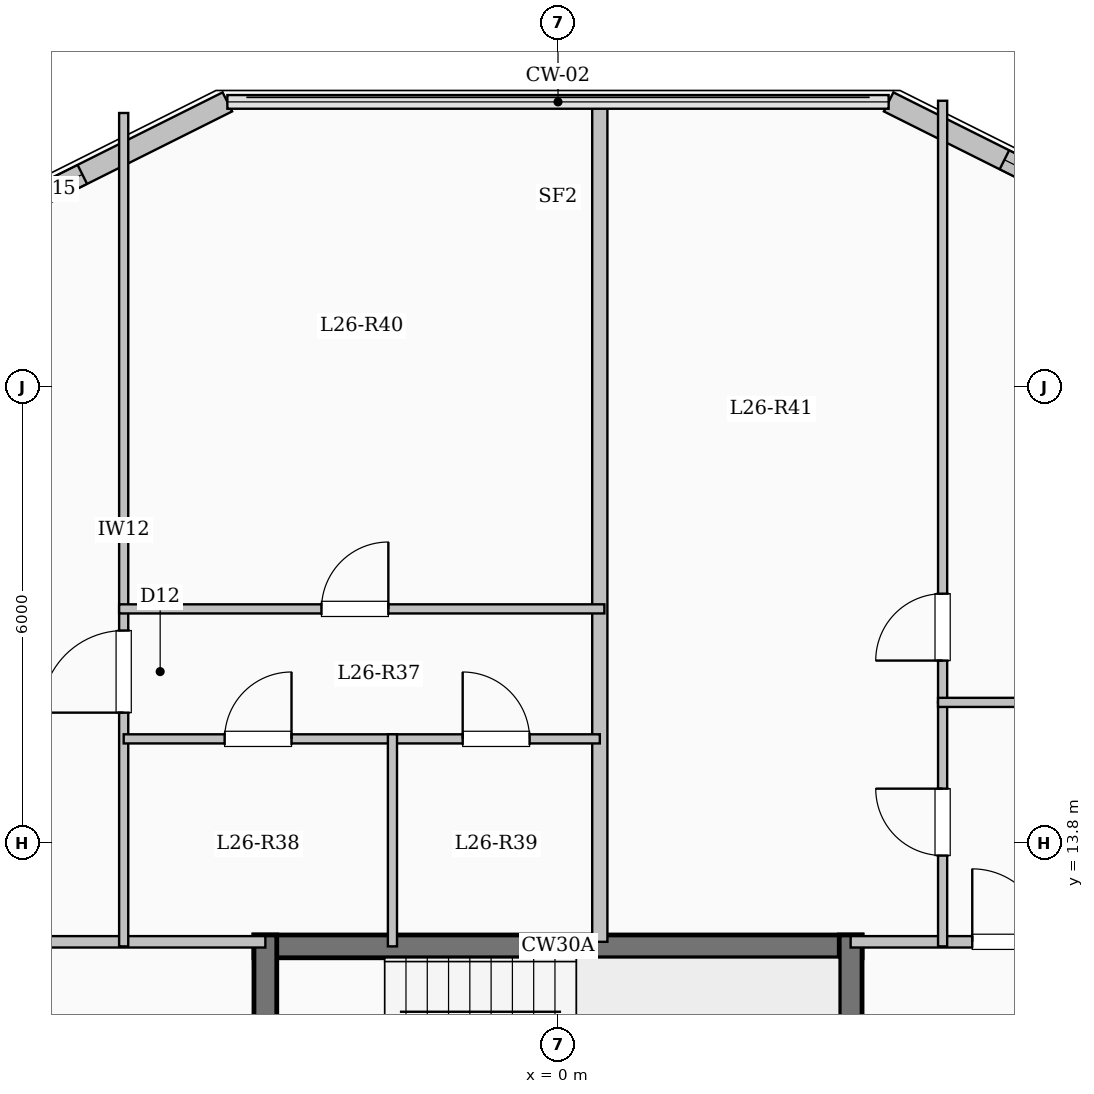
"""IFC4 building model, lengths in metres.
Left out: names, types, materials, properties, quantities, classifications, styles, units other than length and angle.
Written with IfcOpenShell. Run it as: python <this file> out.ifc"""

import sys

from ifc_helpers import new_model, si_unit, direction, frame, frame_2d, origin, place, context, subcontext, project, spatial, rectangle, extrude, element, fill, save


model = new_model("IFC4")
c1 = context("Model", 3, precision=1e-05, world=origin(), true_north=direction((0.0, 1.0)))
c2 = subcontext(c1, "Body", "Model", "MODEL_VIEW")
j1 = project(units=[si_unit("LENGTHUNIT", "METRE"), si_unit("PLANEANGLEUNIT", "RADIAN")], contexts=[c1])
p1 = place(None, origin())
s1 = spatial("IfcSite", under=j1, at=p1, CompositionType="ELEMENT")
p2 = place(p1, origin())
s2 = spatial("IfcBuilding", under=s1, at=p2, CompositionType="ELEMENT")
p3 = place(p2, frame((0.0, 0.0, 98.4)))
s3 = spatial("IfcBuildingStorey", under=s2, at=p3, CompositionType="ELEMENT", Elevation=98.4)
p4 = place(p3, frame((-7.35, 22.05, 0.0), z_axis=(0.0, 0.0, 1.0), x_axis=(0.894427191, 0.4472135955, 0.0)))
e1 = element("IfcWall", 1, at=p4, inside=s3, PredefinedType="SOLIDWALL", context=c2, shape_type="SweptSolid", body=[
    extrude(rectangle(XDim=3.354, YDim=0.28, at=frame_2d((1.677, 0.0))), origin(), (0.0, 0.0, 1.0), 3.1),
])
p5 = place(p4, frame((0.371, 0.0, 0.95)))
e2 = element("IfcOpeningElement", 2, at=p5, cuts=e1, PredefinedType="OPENING", context=c2, shape_type="SweptSolid", body=[
    extrude(rectangle(XDim=0.85, YDim=1.5, at=frame_2d((0.425, 0.75))), frame((0.0, 0.15, 0.0), z_axis=(0.0, -1.0, 0.0), x_axis=(1.0, 0.0, 0.0)), (0.0, 0.0, 1.0), 0.3),
])
p6 = place(p3, frame((4.35, 23.55, 0.0), z_axis=(0.0, 0.0, 1.0), x_axis=(0.894427191, -0.4472135955, 0.0)))
e3 = element("IfcWall", 3, at=p6, inside=s3, PredefinedType="SOLIDWALL", context=c2, shape_type="SweptSolid", body=[
    extrude(rectangle(XDim=3.354, YDim=0.28, at=frame_2d((1.677, 0.0))), origin(), (0.0, 0.0, 1.0), 3.1),
])
p7 = place(p6, frame((1.703, 0.0, 0.95)))
e4 = element("IfcOpeningElement", 4, at=p7, cuts=e3, PredefinedType="OPENING", context=c2, shape_type="SweptSolid", body=[
    extrude(rectangle(XDim=1.2, YDim=1.5, at=frame_2d((0.6, 0.75))), frame((0.0, 0.15, 0.0), z_axis=(0.0, -1.0, 0.0), x_axis=(1.0, 0.0, 0.0)), (0.0, 0.0, 1.0), 0.3),
])
p8 = place(p3, frame((-4.0, 12.44, 0.0), z_axis=(0.0, 0.0, 1.0), x_axis=(1.0, 0.0, 0.0)))
e5 = element("IfcWall", 5, at=p8, inside=s3, PredefinedType="SHEAR", context=c2, shape_type="SweptSolid", body=[
    extrude(rectangle(XDim=8.0, YDim=0.3, at=frame_2d((4.0, 0.0))), origin(), (0.0, 0.0, 1.0), 3.35),
])
for number, where, z_axis, x_axis in (
    (6, (-3.85, 9.0, 0.0), (0.0, 0.0, 1.0), (0.0, 1.0, 0.0)),
    (7, (3.85, 9.0, 0.0), (0.0, 0.0, 1.0), (0.0, 1.0, 0.0)),
):
    element("IfcWall", number, at=place(p3, frame(where, z_axis=z_axis, x_axis=x_axis)), inside=s3, PredefinedType="SHEAR", context=c2, shape_type="SweptSolid", body=[
        extrude(rectangle(XDim=3.59, YDim=0.3, at=frame_2d((1.795, 0.0))), origin(), (0.0, 0.0, 1.0), 3.35),
    ])
p9 = place(p3, frame((-21.05, 12.5, 0.0), z_axis=(0.0, 0.0, 1.0), x_axis=(1.0, 0.0, 0.0)))
e8 = element("IfcWall", 8, at=p9, inside=s3, PredefinedType="PARTITIONING", context=c2, shape_type="SweptSolid", body=[
    extrude(rectangle(XDim=17.2, YDim=0.15, at=frame_2d((8.6, 0.0))), origin(), (0.0, 0.0, 1.0), 3.1),
])
p10 = place(p9, frame((0.7, 0.0, 0.0)))
e9 = element("IfcOpeningElement", 9, at=p10, cuts=e8, PredefinedType="OPENING", context=c2, shape_type="SweptSolid", body=[
    extrude(rectangle(XDim=0.96, YDim=2.15, at=frame_2d((0.48, 1.075))), frame((0.0, 0.085, 0.0), z_axis=(0.0, -1.0, 0.0), x_axis=(1.0, 0.0, 0.0)), (0.0, 0.0, 1.0), 0.17),
])
p11 = place(p9, frame((9.772, 0.0, 0.0)))
e10 = element("IfcOpeningElement", 10, at=p11, cuts=e8, PredefinedType="OPENING", context=c2, shape_type="SweptSolid", body=[
    extrude(rectangle(XDim=0.96, YDim=2.15, at=frame_2d((0.48, 1.075))), frame((0.0, 0.085, 0.0), z_axis=(0.0, -1.0, 0.0), x_axis=(1.0, 0.0, 0.0)), (0.0, 0.0, 1.0), 0.17),
])
p12 = place(p3, frame((3.85, 12.5, 0.0), z_axis=(0.0, 0.0, 1.0), x_axis=(1.0, 0.0, 0.0)))
e11 = element("IfcWall", 11, at=p12, inside=s3, PredefinedType="PARTITIONING", context=c2, shape_type="SweptSolid", body=[
    extrude(rectangle(XDim=17.2, YDim=0.15, at=frame_2d((8.6, 0.0))), origin(), (0.0, 0.0, 1.0), 3.1),
])
p13 = place(p12, frame((1.6, 0.0, 0.0)))
e12 = element("IfcOpeningElement", 12, at=p13, cuts=e11, PredefinedType="OPENING", context=c2, shape_type="SweptSolid", body=[
    extrude(rectangle(XDim=0.96, YDim=2.15, at=frame_2d((0.48, 1.075))), frame((0.0, 0.085, 0.0), z_axis=(0.0, -1.0, 0.0), x_axis=(1.0, 0.0, 0.0)), (0.0, 0.0, 1.0), 0.17),
])
p14 = place(p12, frame((6.42, 0.0, 0.0)))
e13 = element("IfcOpeningElement", 13, at=p14, cuts=e11, PredefinedType="OPENING", context=c2, shape_type="SweptSolid", body=[
    extrude(rectangle(XDim=0.96, YDim=2.15, at=frame_2d((0.48, 1.075))), frame((0.0, 0.085, 0.0), z_axis=(0.0, -1.0, 0.0), x_axis=(1.0, 0.0, 0.0)), (0.0, 0.0, 1.0), 0.17),
])
p15 = place(p3, frame((0.55, 12.5, 0.0), z_axis=(0.0, 0.0, 1.0), x_axis=(0.0, 1.0, 0.0)))
e14 = element("IfcWall", 14, at=p15, inside=s3, PredefinedType="SOLIDWALL", context=c2, shape_type="SweptSolid", body=[
    extrude(rectangle(XDim=11.08, YDim=0.2, at=frame_2d((5.54, 0.0))), origin(), (0.0, 0.0, 1.0), 3.1),
])
p16 = place(p3, frame((-5.714, 12.44, 0.0), z_axis=(0.0, 0.0, 1.0), x_axis=(0.0, 1.0, 0.0)))
e15 = element("IfcWall", 15, at=p16, inside=s3, PredefinedType="PARTITIONING", context=c2, shape_type="SweptSolid", body=[
    extrude(rectangle(XDim=10.964, YDim=0.12, at=frame_2d((5.482, 0.0))), origin(), (0.0, 0.0, 1.0), 3.1),
])
p17 = place(p16, frame((3.075, 0.0, 0.0)))
e16 = element("IfcOpeningElement", 16, at=p17, cuts=e15, PredefinedType="OPENING", context=c2, shape_type="SweptSolid", body=[
    extrude(rectangle(XDim=1.08, YDim=2.15, at=frame_2d((0.54, 1.075))), frame((0.0, 0.07, 0.0), z_axis=(0.0, -1.0, 0.0), x_axis=(1.0, 0.0, 0.0)), (0.0, 0.0, 1.0), 0.14),
])
p18 = place(p3, frame((-5.714, 15.17, 0.0), z_axis=(0.0, 0.0, 1.0), x_axis=(1.0, 0.0, 0.0)))
e17 = element("IfcWall", 17, at=p18, inside=s3, PredefinedType="PARTITIONING", context=c2, shape_type="SweptSolid", body=[
    extrude(rectangle(XDim=3.536, YDim=0.12, at=frame_2d((1.768, 0.0))), origin(), (0.0, 0.0, 1.0), 3.1),
])
p19 = place(p18, frame((1.328, 0.0, 0.0)))
e18 = element("IfcOpeningElement", 18, at=p19, cuts=e17, PredefinedType="OPENING", context=c2, shape_type="SweptSolid", body=[
    extrude(rectangle(XDim=0.88, YDim=2.1, at=frame_2d((0.44, 1.05))), frame((0.0, 0.07, 0.0), z_axis=(0.0, -1.0, 0.0), x_axis=(1.0, 0.0, 0.0)), (0.0, 0.0, 1.0), 0.14),
])
p20 = place(p3, frame((-2.178, 15.17, 0.0), z_axis=(0.0, 0.0, 1.0), x_axis=(1.0, 0.0, 0.0)))
e19 = element("IfcWall", 19, at=p20, inside=s3, PredefinedType="PARTITIONING", context=c2, shape_type="SweptSolid", body=[
    extrude(rectangle(XDim=2.728, YDim=0.12, at=frame_2d((1.364, 0.0))), origin(), (0.0, 0.0, 1.0), 3.1),
])
p21 = place(p20, frame((0.924, 0.0, 0.0)))
e20 = element("IfcOpeningElement", 20, at=p21, cuts=e19, PredefinedType="OPENING", context=c2, shape_type="SweptSolid", body=[
    extrude(rectangle(XDim=0.88, YDim=2.1, at=frame_2d((0.44, 1.05))), frame((0.0, 0.07, 0.0), z_axis=(0.0, -1.0, 0.0), x_axis=(1.0, 0.0, 0.0)), (0.0, 0.0, 1.0), 0.14),
])
p22 = place(p3, frame((-5.774, 16.88, 0.0), z_axis=(0.0, 0.0, 1.0), x_axis=(1.0, 0.0, 0.0)))
e21 = element("IfcWall", 21, at=p22, inside=s3, PredefinedType="PARTITIONING", context=c2, shape_type="SweptSolid", body=[
    extrude(rectangle(XDim=6.384, YDim=0.12, at=frame_2d((3.192, 0.0))), origin(), (0.0, 0.0, 1.0), 3.1),
])
p23 = place(p22, frame((2.662, 0.0, 0.0)))
e22 = element("IfcOpeningElement", 22, at=p23, cuts=e21, PredefinedType="OPENING", context=c2, shape_type="SweptSolid", body=[
    extrude(rectangle(XDim=0.88, YDim=2.1, at=frame_2d((0.44, 1.05))), frame((0.0, 0.07, 0.0), z_axis=(0.0, -1.0, 0.0), x_axis=(1.0, 0.0, 0.0)), (0.0, 0.0, 1.0), 0.14),
])
p24 = place(p3, frame((-2.178, 12.44, 0.0), z_axis=(0.0, 0.0, 1.0), x_axis=(0.0, 1.0, 0.0)))
e23 = element("IfcWall", 23, at=p24, inside=s3, PredefinedType="PARTITIONING", context=c2, shape_type="SweptSolid", body=[
    extrude(rectangle(XDim=2.79, YDim=0.12, at=frame_2d((1.395, 0.0))), origin(), (0.0, 0.0, 1.0), 3.1),
])
p25 = place(p3, frame((5.06, 12.44, 0.0), z_axis=(0.0, 0.0, 1.0), x_axis=(0.0, 1.0, 0.0)))
e24 = element("IfcWall", 24, at=p25, inside=s3, PredefinedType="PARTITIONING", context=c2, shape_type="SweptSolid", body=[
    extrude(rectangle(XDim=3.21, YDim=0.12, at=frame_2d((1.605, 0.0))), origin(), (0.0, 0.0, 1.0), 3.1),
])
p26 = place(p25, frame((1.195, 0.0, 0.0)))
e25 = element("IfcOpeningElement", 25, at=p26, cuts=e24, PredefinedType="OPENING", context=c2, shape_type="SweptSolid", body=[
    extrude(rectangle(XDim=0.88, YDim=2.1, at=frame_2d((0.44, 1.05))), frame((0.0, 0.07, 0.0), z_axis=(0.0, -1.0, 0.0), x_axis=(1.0, 0.0, 0.0)), (0.0, 0.0, 1.0), 0.14),
])
p27 = place(p3, frame((5.06, 15.65, 0.0), z_axis=(0.0, 0.0, 1.0), x_axis=(0.0, 1.0, 0.0)))
e26 = element("IfcWall", 26, at=p27, inside=s3, PredefinedType="PARTITIONING", context=c2, shape_type="SweptSolid", body=[
    extrude(rectangle(XDim=7.915, YDim=0.12, at=frame_2d((3.958, 0.0))), origin(), (0.0, 0.0, 1.0), 3.1),
])
p28 = place(p27, frame((0.55, 0.0, 0.0)))
e27 = element("IfcOpeningElement", 27, at=p28, cuts=e26, PredefinedType="OPENING", context=c2, shape_type="SweptSolid", body=[
    extrude(rectangle(XDim=0.88, YDim=2.1, at=frame_2d((0.44, 1.05))), frame((0.0, 0.07, 0.0), z_axis=(0.0, -1.0, 0.0), x_axis=(1.0, 0.0, 0.0)), (0.0, 0.0, 1.0), 0.14),
])
p29 = place(p3, frame((5.0, 15.65, 0.0), z_axis=(0.0, 0.0, 1.0), x_axis=(1.0, 0.0, 0.0)))
e28 = element("IfcWall", 28, at=p29, inside=s3, PredefinedType="PARTITIONING", context=c2, shape_type="SweptSolid", body=[
    extrude(rectangle(XDim=4.63, YDim=0.12, at=frame_2d((2.315, 0.0))), origin(), (0.0, 0.0, 1.0), 3.1),
])
p30 = place(p5, origin())
e29 = element("IfcWindow", 29, at=p30, inside=s3, PartitioningType="SINGLE_PANEL", PredefinedType="WINDOW", context=c2, shape_type="SweptSolid", body=[
    extrude(rectangle(XDim=0.85, YDim=1.5, at=frame_2d((0.425, 0.75))), frame((0.0, 0.03, 0.0), z_axis=(0.0, -1.0, 0.0), x_axis=(1.0, 0.0, 0.0)), (0.0, 0.0, 1.0), 0.06),
])
fill(e2, e29)
p31 = place(p7, origin())
e30 = element("IfcWindow", 30, at=p31, inside=s3, PartitioningType="SINGLE_PANEL", PredefinedType="WINDOW", context=c2, shape_type="SweptSolid", body=[
    extrude(rectangle(XDim=1.2, YDim=1.5, at=frame_2d((0.6, 0.75))), frame((0.0, 0.03, 0.0), z_axis=(0.0, -1.0, 0.0), x_axis=(1.0, 0.0, 0.0)), (0.0, 0.0, 1.0), 0.06),
])
fill(e4, e30)
p32 = place(p17, origin())
e31 = element("IfcDoor", 31, at=p32, inside=s3, OperationType="SINGLE_SWING_LEFT", PredefinedType="DOOR", context=c2, shape_type="SweptSolid", body=[
    extrude(rectangle(XDim=1.08, YDim=2.15, at=frame_2d((0.54, 1.075))), frame((0.0, 0.025, 0.0), z_axis=(0.0, -1.0, 0.0), x_axis=(1.0, 0.0, 0.0)), (0.0, 0.0, 1.0), 0.05),
])
fill(e16, e31)
p33 = place(p19, origin())
e32 = element("IfcDoor", 32, at=p33, inside=s3, OperationType="SINGLE_SWING_RIGHT", PredefinedType="DOOR", context=c2, shape_type="SweptSolid", body=[
    extrude(rectangle(XDim=0.88, YDim=2.1, at=frame_2d((0.44, 1.05))), frame((0.0, 0.025, 0.0), z_axis=(0.0, -1.0, 0.0), x_axis=(1.0, 0.0, 0.0)), (0.0, 0.0, 1.0), 0.05),
])
fill(e18, e32)
p34 = place(p21, origin())
e33 = element("IfcDoor", 33, at=p34, inside=s3, OperationType="SINGLE_SWING_LEFT", PredefinedType="DOOR", context=c2, shape_type="SweptSolid", body=[
    extrude(rectangle(XDim=0.88, YDim=2.1, at=frame_2d((0.44, 1.05))), frame((0.0, 0.025, 0.0), z_axis=(0.0, -1.0, 0.0), x_axis=(1.0, 0.0, 0.0)), (0.0, 0.0, 1.0), 0.05),
])
fill(e20, e33)
p35 = place(p23, origin())
e34 = element("IfcDoor", 34, at=p35, inside=s3, OperationType="SINGLE_SWING_RIGHT", PredefinedType="DOOR", context=c2, shape_type="SweptSolid", body=[
    extrude(rectangle(XDim=0.88, YDim=2.1, at=frame_2d((0.44, 1.05))), frame((0.0, 0.025, 0.0), z_axis=(0.0, -1.0, 0.0), x_axis=(1.0, 0.0, 0.0)), (0.0, 0.0, 1.0), 0.05),
])
fill(e22, e34)
p36 = place(p13, origin())
e35 = element("IfcDoor", 35, at=p36, inside=s3, OperationType="SINGLE_SWING_LEFT", PredefinedType="DOOR", context=c2, shape_type="SweptSolid", body=[
    extrude(rectangle(XDim=0.96, YDim=2.15, at=frame_2d((0.48, 1.075))), frame((0.0, 0.025, 0.0), z_axis=(0.0, -1.0, 0.0), x_axis=(1.0, 0.0, 0.0)), (0.0, 0.0, 1.0), 0.05),
])
fill(e12, e35)
p37 = place(p26, origin())
e36 = element("IfcDoor", 36, at=p37, inside=s3, OperationType="SINGLE_SWING_RIGHT", PredefinedType="DOOR", context=c2, shape_type="SweptSolid", body=[
    extrude(rectangle(XDim=0.88, YDim=2.1, at=frame_2d((0.44, 1.05))), frame((0.0, 0.025, 0.0), z_axis=(0.0, -1.0, 0.0), x_axis=(1.0, 0.0, 0.0)), (0.0, 0.0, 1.0), 0.05),
])
fill(e25, e36)
p38 = place(p28, origin())
e37 = element("IfcDoor", 37, at=p38, inside=s3, OperationType="SINGLE_SWING_LEFT", PredefinedType="DOOR", context=c2, shape_type="SweptSolid", body=[
    extrude(rectangle(XDim=0.88, YDim=2.1, at=frame_2d((0.44, 1.05))), frame((0.0, 0.025, 0.0), z_axis=(0.0, -1.0, 0.0), x_axis=(1.0, 0.0, 0.0)), (0.0, 0.0, 1.0), 0.05),
])
fill(e27, e37)
save(model, sys.argv[1])
